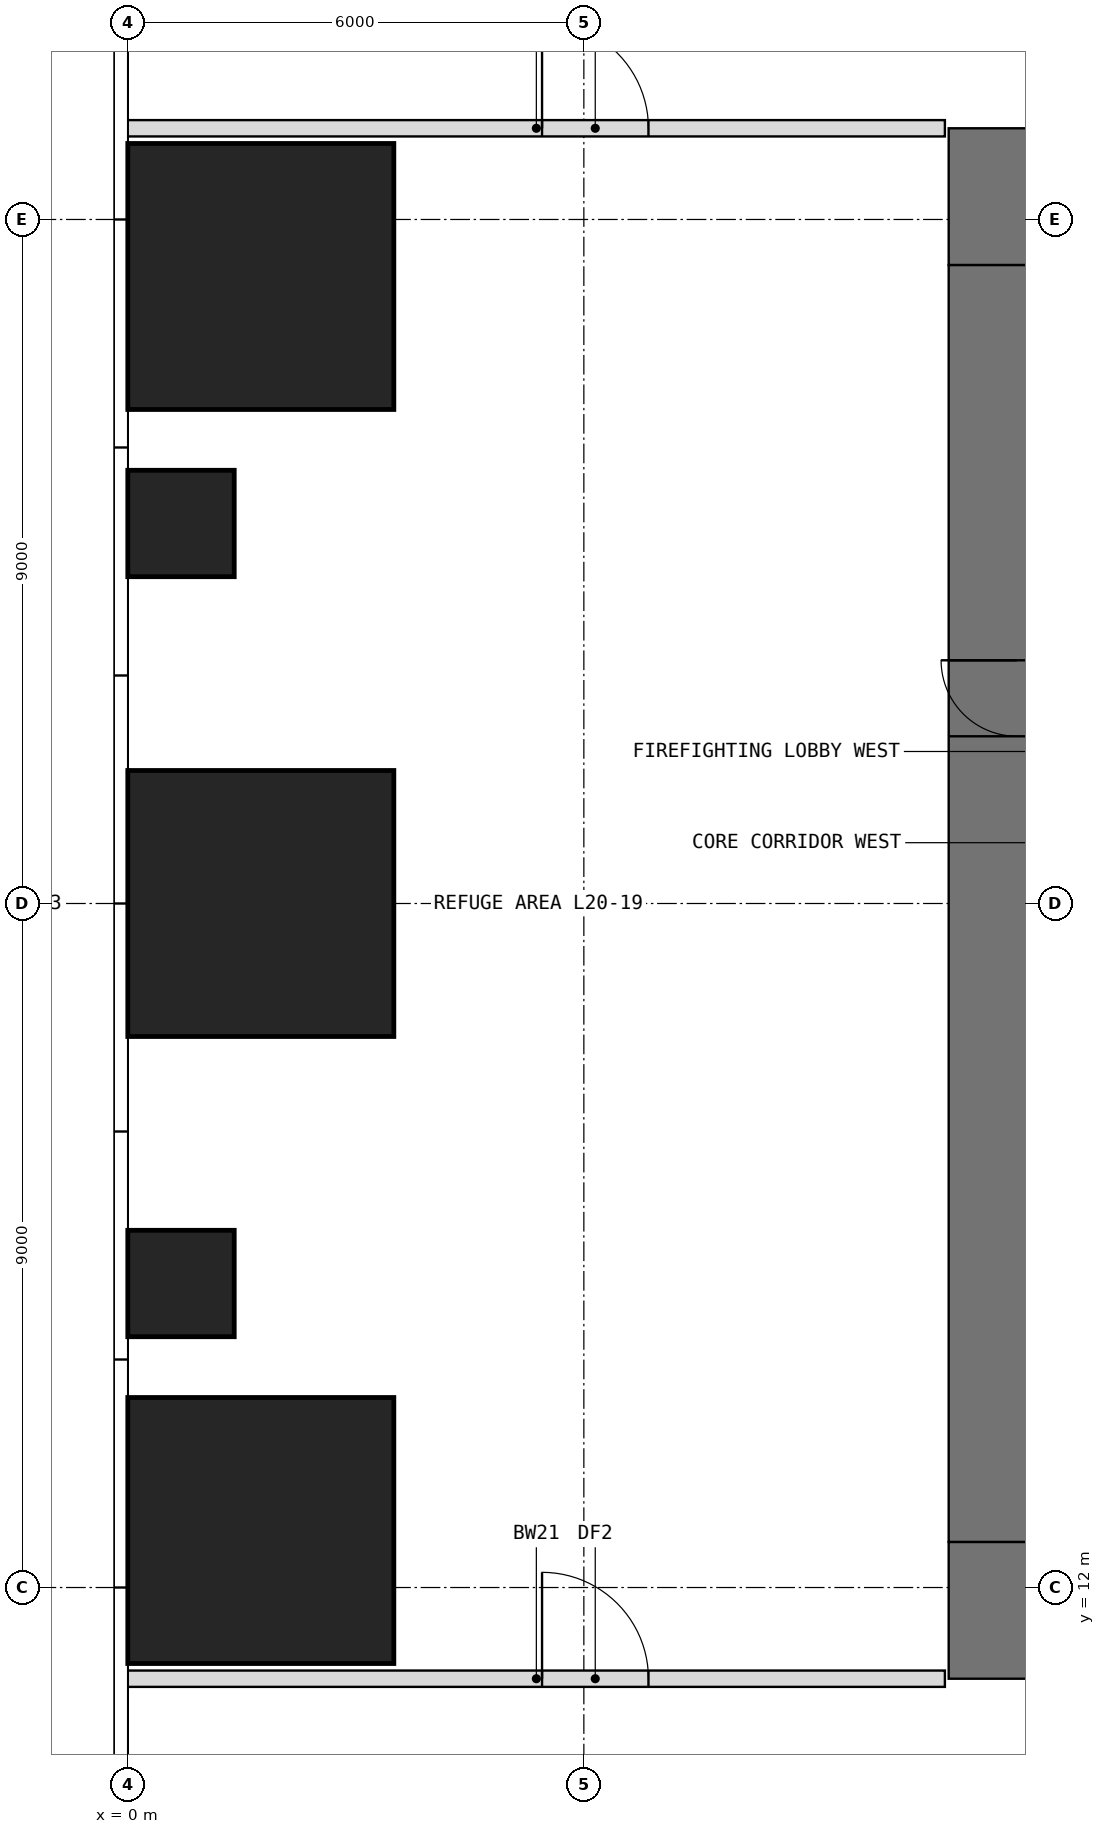
"""IFC4 building model, lengths in metres.
Left out: names, types, materials, properties, quantities, classifications, styles, units other than length and angle.
Written with IfcOpenShell. Run it as: python <this file> out.ifc"""

import sys

from ifc_helpers import new_model, si_unit, direction, frame, frame_2d, origin, origin_2d, place, context, subcontext, project, spatial, rectangle, extrude, element, fill, save


model = new_model("IFC4")
c1 = context("Model", 3, precision=1e-05, world=origin(), true_north=direction((0.0, 1.0)))
c2 = subcontext(c1, "Body", "Model", "MODEL_VIEW")
j1 = project(units=[si_unit("LENGTHUNIT", "METRE"), si_unit("PLANEANGLEUNIT", "RADIAN")], contexts=[c1])
p1 = place(None, origin())
s1 = spatial("IfcSite", under=j1, at=p1, CompositionType="ELEMENT")
p2 = place(p1, origin())
s2 = spatial("IfcBuilding", under=s1, at=p2, CompositionType="ELEMENT")
p3 = place(p2, frame((0.0, 0.0, 86.5)))
s3 = spatial("IfcBuildingStorey", under=s2, at=p3, CompositionType="ELEMENT", Elevation=86.5)
p4 = place(p3, frame((1.75, 12.75, 0.0), z_axis=(0.0, 0.0, 1.0), x_axis=(1.0, 0.0, 0.0)))
e1 = element("IfcColumn", 1, at=p4, inside=s3, PredefinedType="COLUMN", context=c2, shape_type="SweptSolid", body=[
    extrude(rectangle(XDim=3.5, YDim=3.5, at=origin_2d()), origin(), (0.0, 0.0, 1.0), 5.0),
])
p5 = place(p3, frame((0.7, 16.0, 0.0), z_axis=(0.0, 0.0, 1.0), x_axis=(1.0, 0.0, 0.0)))
e2 = element("IfcColumn", 2, at=p5, inside=s3, PredefinedType="COLUMN", context=c2, shape_type="SweptSolid", body=[
    extrude(rectangle(XDim=1.4, YDim=1.4, at=origin_2d()), origin(), (0.0, 0.0, 1.0), 5.0),
])
p6 = place(p3, frame((1.75, 21.0, 0.0), z_axis=(0.0, 0.0, 1.0), x_axis=(1.0, 0.0, 0.0)))
e3 = element("IfcColumn", 3, at=p6, inside=s3, PredefinedType="COLUMN", context=c2, shape_type="SweptSolid", body=[
    extrude(rectangle(XDim=3.5, YDim=3.5, at=origin_2d()), origin(), (0.0, 0.0, 1.0), 5.0),
])
p7 = place(p3, frame((0.7, 26.0, 0.0), z_axis=(0.0, 0.0, 1.0), x_axis=(1.0, 0.0, 0.0)))
e4 = element("IfcColumn", 4, at=p7, inside=s3, PredefinedType="COLUMN", context=c2, shape_type="SweptSolid", body=[
    extrude(rectangle(XDim=1.4, YDim=1.4, at=origin_2d()), origin(), (0.0, 0.0, 1.0), 5.0),
])
p8 = place(p3, frame((1.75, 29.25, 0.0), z_axis=(0.0, 0.0, 1.0), x_axis=(1.0, 0.0, 0.0)))
e5 = element("IfcColumn", 5, at=p8, inside=s3, PredefinedType="COLUMN", context=c2, shape_type="SweptSolid", body=[
    extrude(rectangle(XDim=3.5, YDim=3.5, at=origin_2d()), origin(), (0.0, 0.0, 1.0), 5.0),
])
p9 = place(p3, frame((10.8, 11.7, -0.25), z_axis=(0.0, 0.0, 1.0), x_axis=(1.0, 0.0, 0.0)))
e6 = element("IfcWall", 6, at=p9, inside=s3, PredefinedType="SHEAR", context=c2, shape_type="SweptSolid", body=[
    extrude(rectangle(XDim=20.4, YDim=1.8, at=frame_2d((10.2, 0.0))), origin(), (0.0, 0.0, 1.0), 5.2),
])
p10 = place(p9, frame((13.125, 0.0, 0.25)))
e7 = element("IfcOpeningElement", 7, at=p10, cuts=e6, PredefinedType="OPENING", context=c2, shape_type="SweptSolid", body=[
    extrude(rectangle(XDim=0.95, YDim=2.4, at=frame_2d((0.475, 1.2))), frame((0.0, 0.91, 0.0), z_axis=(0.0, -1.0, 0.0), x_axis=(1.0, 0.0, 0.0)), (0.0, 0.0, 1.0), 1.82),
])
p11 = place(p3, frame((10.8, 30.3, -0.25), z_axis=(0.0, 0.0, 1.0), x_axis=(1.0, 0.0, 0.0)))
e8 = element("IfcWall", 8, at=p11, inside=s3, PredefinedType="SHEAR", context=c2, shape_type="SweptSolid", body=[
    extrude(rectangle(XDim=20.4, YDim=1.8, at=frame_2d((10.2, 0.0))), origin(), (0.0, 0.0, 1.0), 5.2),
])
p12 = place(p11, frame((6.325, 0.0, 0.25)))
e9 = element("IfcOpeningElement", 9, at=p12, cuts=e8, PredefinedType="OPENING", context=c2, shape_type="SweptSolid", body=[
    extrude(rectangle(XDim=0.95, YDim=2.4, at=frame_2d((0.475, 1.2))), frame((0.0, 0.91, 0.0), z_axis=(0.0, -1.0, 0.0), x_axis=(1.0, 0.0, 0.0)), (0.0, 0.0, 1.0), 1.82),
])
p13 = place(p3, frame((11.7, 12.6, -0.25), z_axis=(0.0, 0.0, 1.0), x_axis=(0.0, 1.0, 0.0)))
e10 = element("IfcWall", 10, at=p13, inside=s3, PredefinedType="SHEAR", context=c2, shape_type="SweptSolid", body=[
    extrude(rectangle(XDim=16.8, YDim=1.8, at=frame_2d((8.4, 0.0))), origin(), (0.0, 0.0, 1.0), 5.2),
])
p14 = place(p13, frame((10.6, 0.0, 0.25)))
e11 = element("IfcOpeningElement", 11, at=p14, cuts=e10, PredefinedType="OPENING", context=c2, shape_type="SweptSolid", body=[
    extrude(rectangle(XDim=1.0, YDim=2.2, at=frame_2d((0.5, 1.1))), frame((0.0, 0.91, 0.0), z_axis=(0.0, -1.0, 0.0), x_axis=(1.0, 0.0, 0.0)), (0.0, 0.0, 1.0), 1.82),
])
p15 = place(p3, frame((0.0, 10.8, 0.0), z_axis=(0.0, 0.0, 1.0), x_axis=(1.0, 0.0, 0.0)))
e12 = element("IfcWall", 12, at=p15, inside=s3, PredefinedType="PARTITIONING", context=c2, shape_type="SweptSolid", body=[
    extrude(rectangle(XDim=10.75, YDim=0.215, at=frame_2d((5.375, 0.0))), origin(), (0.0, 0.0, 1.0), 4.75),
])
p16 = place(p15, frame((5.45, 0.0, 0.0)))
e13 = element("IfcOpeningElement", 13, at=p16, cuts=e12, PredefinedType="OPENING", context=c2, shape_type="SweptSolid", body=[
    extrude(rectangle(XDim=1.4, YDim=2.2, at=frame_2d((0.7, 1.1))), frame((0.0, 0.118, 0.0), z_axis=(0.0, -1.0, 0.0), x_axis=(1.0, 0.0, 0.0)), (0.0, 0.0, 1.0), 0.235),
])
p17 = place(p3, frame((0.0, 31.2, 0.0), z_axis=(0.0, 0.0, 1.0), x_axis=(1.0, 0.0, 0.0)))
e14 = element("IfcWall", 14, at=p17, inside=s3, PredefinedType="PARTITIONING", context=c2, shape_type="SweptSolid", body=[
    extrude(rectangle(XDim=10.75, YDim=0.215, at=frame_2d((5.375, 0.0))), origin(), (0.0, 0.0, 1.0), 4.75),
])
p18 = place(p17, frame((5.45, 0.0, 0.0)))
e15 = element("IfcOpeningElement", 15, at=p18, cuts=e14, PredefinedType="OPENING", context=c2, shape_type="SweptSolid", body=[
    extrude(rectangle(XDim=1.4, YDim=2.2, at=frame_2d((0.7, 1.1))), frame((0.0, 0.118, 0.0), z_axis=(0.0, -1.0, 0.0), x_axis=(1.0, 0.0, 0.0)), (0.0, 0.0, 1.0), 0.235),
])
p19 = place(p14, origin())
e16 = element("IfcDoor", 16, at=p19, inside=s3, OperationType="SINGLE_SWING_RIGHT", PredefinedType="DOOR", context=c2, shape_type="SweptSolid", body=[
    extrude(rectangle(XDim=1.0, YDim=2.2, at=frame_2d((0.5, 1.1))), frame((0.0, 0.025, 0.0), z_axis=(0.0, -1.0, 0.0), x_axis=(1.0, 0.0, 0.0)), (0.0, 0.0, 1.0), 0.05),
])
fill(e11, e16)
p20 = place(p16, origin())
e17 = element("IfcDoor", 17, at=p20, inside=s3, OperationType="SINGLE_SWING_LEFT", PredefinedType="DOOR", context=c2, shape_type="SweptSolid", body=[
    extrude(rectangle(XDim=1.4, YDim=2.2, at=frame_2d((0.7, 1.1))), frame((0.0, 0.025, 0.0), z_axis=(0.0, -1.0, 0.0), x_axis=(1.0, 0.0, 0.0)), (0.0, 0.0, 1.0), 0.05),
])
fill(e13, e17)
p21 = place(p18, origin())
e18 = element("IfcDoor", 18, at=p21, inside=s3, OperationType="SINGLE_SWING_LEFT", PredefinedType="DOOR", context=c2, shape_type="SweptSolid", body=[
    extrude(rectangle(XDim=1.4, YDim=2.2, at=frame_2d((0.7, 1.1))), frame((0.0, 0.025, 0.0), z_axis=(0.0, -1.0, 0.0), x_axis=(1.0, 0.0, 0.0)), (0.0, 0.0, 1.0), 0.05),
])
fill(e15, e18)
save(model, sys.argv[1])
